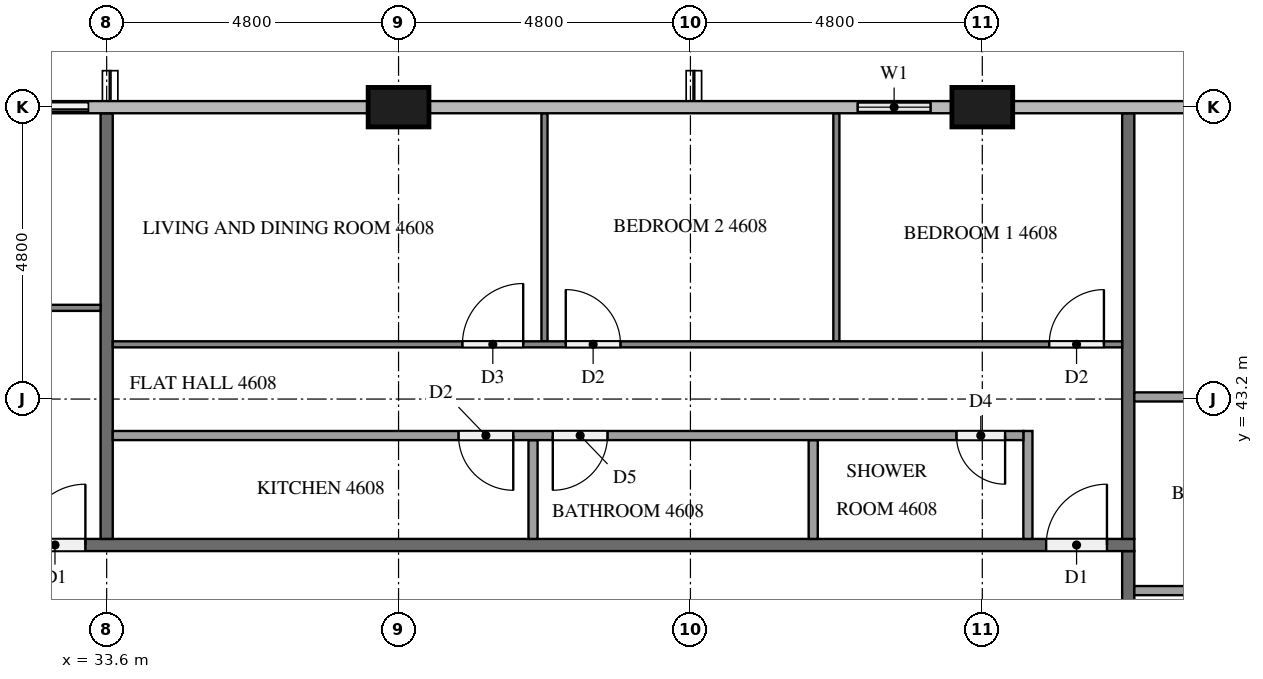
"""IFC4 building model, lengths in metres.
Left out: names, types, materials, properties, quantities, classifications, styles, units other than length and angle.
Written with IfcOpenShell. Run it as: python <this file> out.ifc"""

import sys

from ifc_helpers import new_model, si_unit, direction, frame, frame_2d, origin, origin_2d, place, context, subcontext, project, spatial, rectangle, extrude, element, fill, save


model = new_model("IFC4")
c1 = context("Model", 3, precision=1e-05, world=origin(), true_north=direction((0.0, 1.0)))
c2 = subcontext(c1, "Body", "Model", "MODEL_VIEW")
j1 = project(units=[si_unit("LENGTHUNIT", "METRE"), si_unit("PLANEANGLEUNIT", "RADIAN")], contexts=[c1])
p1 = place(None, origin())
s1 = spatial("IfcSite", under=j1, at=p1, CompositionType="ELEMENT")
p2 = place(p1, origin())
s2 = spatial("IfcBuilding", under=s1, at=p2, CompositionType="ELEMENT")
p3 = place(p2, frame((0.0, 0.0, 178.9)))
s3 = spatial("IfcBuildingStorey", under=s2, at=p3, CompositionType="ELEMENT", Elevation=178.9)
for number, where, z_axis, x_axis in (
    (1, (48.0, 48.0, 0.0), (0.0, 0.0, 1.0), (1.0, 0.0, 0.0)),
    (2, (38.4, 48.0, 0.0), (0.0, 0.0, 1.0), (1.0, 0.0, 0.0)),
):
    element("IfcColumn", number, at=place(p3, frame(where, z_axis=z_axis, x_axis=x_axis)), inside=s3, PredefinedType="COLUMN", context=c2, shape_type="SweptSolid", body=[
        extrude(rectangle(XDim=1.0, YDim=0.65, at=origin_2d()), origin(), (0.0, 0.0, 1.0), 3.2),
    ])
p4 = place(p3, frame((47.5, 48.0, 0.0), z_axis=(0.0, 0.0, 1.0), x_axis=(-1.0, 0.0, 0.0)))
e3 = element("IfcWall", 3, at=p4, inside=s3, PredefinedType="SOLIDWALL", context=c2, shape_type="SweptSolid", body=[
    extrude(rectangle(XDim=1.9, YDim=0.15, at=frame_2d((0.95, 0.0))), origin(), (0.0, 0.0, 1.0), 3.2),
])
p5 = place(p4, frame((0.35, 0.0, 0.9)))
e4 = element("IfcOpeningElement", 4, at=p5, cuts=e3, PredefinedType="OPENING", context=c2, shape_type="SweptSolid", body=[
    extrude(rectangle(XDim=1.2, YDim=1.4, at=frame_2d((0.6, 0.7))), frame((0.0, 0.085, 0.0), z_axis=(0.0, -1.0, 0.0), x_axis=(1.0, 0.0, 0.0)), (0.0, 0.0, 1.0), 0.17),
])
p6 = place(p3, frame((33.6, 48.0, 0.0), z_axis=(0.0, 0.0, 1.0), x_axis=(-1.0, 0.0, 0.0)))
e5 = element("IfcWall", 5, at=p6, inside=s3, PredefinedType="SOLIDWALL", context=c2, shape_type="SweptSolid", body=[
    extrude(rectangle(XDim=2.4, YDim=0.15, at=frame_2d((1.2, 0.0))), origin(), (0.0, 0.0, 1.0), 3.2),
])
p7 = place(p6, frame((0.3, 0.0, 0.0)))
e6 = element("IfcOpeningElement", 6, at=p7, cuts=e5, PredefinedType="OPENING", context=c2, shape_type="SweptSolid", body=[
    extrude(rectangle(XDim=1.8, YDim=2.4, at=frame_2d((0.9, 1.2))), frame((0.0, 0.085, 0.0), z_axis=(0.0, -1.0, 0.0), x_axis=(1.0, 0.0, 0.0)), (0.0, 0.0, 1.0), 0.17),
])
p8 = place(p3, frame((50.4, 40.7, 0.0), z_axis=(0.0, 0.0, 1.0), x_axis=(0.0, -1.0, 0.0)))
e7 = element("IfcWall", 7, at=p8, inside=s3, PredefinedType="PARTITIONING", context=c2, shape_type="SweptSolid", body=[
    extrude(rectangle(XDim=28.6, YDim=0.2, at=frame_2d((14.3, 0.0))), origin(), (0.0, 0.0, 1.0), 3.2),
])
p9 = place(p8, frame((27.3, 0.0, 0.0)))
e8 = element("IfcOpeningElement", 8, at=p9, cuts=e7, PredefinedType="OPENING", context=c2, shape_type="SweptSolid", body=[
    extrude(rectangle(XDim=1.1, YDim=2.1, at=frame_2d((0.55, 1.05))), frame((0.0, 0.11, 0.0), z_axis=(0.0, -1.0, 0.0), x_axis=(1.0, 0.0, 0.0)), (0.0, 0.0, 1.0), 0.22),
])
p10 = place(p8, frame((8.15, 0.0, 0.0)))
e9 = element("IfcOpeningElement", 9, at=p10, cuts=e7, PredefinedType="OPENING", context=c2, shape_type="SweptSolid", body=[
    extrude(rectangle(XDim=1.0, YDim=2.1, at=frame_2d((0.5, 1.05))), frame((0.0, 0.11, 0.0), z_axis=(0.0, -1.0, 0.0), x_axis=(1.0, 0.0, 0.0)), (0.0, 0.0, 1.0), 0.22),
])
p11 = place(p8, frame((0.95, 0.0, 0.0)))
e10 = element("IfcOpeningElement", 10, at=p11, cuts=e7, PredefinedType="OPENING", context=c2, shape_type="SweptSolid", body=[
    extrude(rectangle(XDim=1.0, YDim=2.1, at=frame_2d((0.5, 1.05))), frame((0.0, 0.11, 0.0), z_axis=(0.0, -1.0, 0.0), x_axis=(1.0, 0.0, 0.0)), (0.0, 0.0, 1.0), 0.22),
])
p12 = place(p3, frame((11.9, 40.8, 0.0), z_axis=(0.0, 0.0, 1.0), x_axis=(1.0, 0.0, 0.0)))
e11 = element("IfcWall", 11, at=p12, inside=s3, PredefinedType="PARTITIONING", context=c2, shape_type="SweptSolid", body=[
    extrude(rectangle(XDim=38.6, YDim=0.2, at=frame_2d((19.3, 0.0))), origin(), (0.0, 0.0, 1.0), 3.2),
])
p13 = place(p12, frame((37.15, 0.0, 0.0)))
e12 = element("IfcOpeningElement", 12, at=p13, cuts=e11, PredefinedType="OPENING", context=c2, shape_type="SweptSolid", body=[
    extrude(rectangle(XDim=1.0, YDim=2.1, at=frame_2d((0.5, 1.05))), frame((0.0, 0.11, 0.0), z_axis=(0.0, -1.0, 0.0), x_axis=(1.0, 0.0, 0.0)), (0.0, 0.0, 1.0), 0.22),
])
p14 = place(p12, frame((20.35, 0.0, 0.0)))
e13 = element("IfcOpeningElement", 13, at=p14, cuts=e11, PredefinedType="OPENING", context=c2, shape_type="SweptSolid", body=[
    extrude(rectangle(XDim=1.0, YDim=2.1, at=frame_2d((0.5, 1.05))), frame((0.0, 0.11, 0.0), z_axis=(0.0, -1.0, 0.0), x_axis=(1.0, 0.0, 0.0)), (0.0, 0.0, 1.0), 0.22),
])
p15 = place(p12, frame((13.15, 0.0, 0.0)))
e14 = element("IfcOpeningElement", 14, at=p15, cuts=e11, PredefinedType="OPENING", context=c2, shape_type="SweptSolid", body=[
    extrude(rectangle(XDim=1.0, YDim=2.1, at=frame_2d((0.5, 1.05))), frame((0.0, 0.11, 0.0), z_axis=(0.0, -1.0, 0.0), x_axis=(1.0, 0.0, 0.0)), (0.0, 0.0, 1.0), 0.22),
])
for number, where, z_axis, x_axis in (
    (15, (50.4, 40.9, 0.0), (0.0, 0.0, 1.0), (0.0, 1.0, 0.0)),
    (16, (33.6, 47.9, 0.0), (0.0, 0.0, 1.0), (0.0, -1.0, 0.0)),
):
    element("IfcWall", number, at=place(p3, frame(where, z_axis=z_axis, x_axis=x_axis)), inside=s3, PredefinedType="PARTITIONING", context=c2, shape_type="SweptSolid", body=[
        extrude(rectangle(XDim=7.0, YDim=0.2, at=frame_2d((3.5, 0.0))), origin(), (0.0, 0.0, 1.0), 3.2),
    ])
p16 = place(p3, frame((50.5, 43.235, 0.0), z_axis=(0.0, 0.0, 1.0), x_axis=(1.0, 0.0, 0.0)))
e17 = element("IfcWall", 17, at=p16, inside=s3, PredefinedType="PARTITIONING", context=c2, shape_type="SweptSolid", body=[
    extrude(rectangle(XDim=3.725, YDim=0.15, at=frame_2d((1.863, 0.0))), origin(), (0.0, 0.0, 1.0), 3.2),
])
p17 = place(p3, frame((50.5, 40.05, 0.0), z_axis=(0.0, 0.0, 1.0), x_axis=(1.0, 0.0, 0.0)))
e18 = element("IfcWall", 18, at=p17, inside=s3, PredefinedType="PARTITIONING", context=c2, shape_type="SweptSolid", body=[
    extrude(rectangle(XDim=3.875, YDim=0.15, at=frame_2d((1.938, 0.0))), origin(), (0.0, 0.0, 1.0), 3.2),
])
for number, where, z_axis, x_axis in (
    (19, (45.6, 44.15, 0.0), (0.0, 0.0, 1.0), (0.0, 1.0, 0.0)),
    (20, (40.8, 44.15, 0.0), (0.0, 0.0, 1.0), (0.0, 1.0, 0.0)),
):
    element("IfcWall", number, at=place(p3, frame(where, z_axis=z_axis, x_axis=x_axis)), inside=s3, PredefinedType="PARTITIONING", context=c2, shape_type="SweptSolid", body=[
        extrude(rectangle(XDim=3.75, YDim=0.1, at=frame_2d((1.875, 0.0))), origin(), (0.0, 0.0, 1.0), 3.2),
    ])
p18 = place(p3, frame((33.7, 44.1, 0.0), z_axis=(0.0, 0.0, 1.0), x_axis=(1.0, 0.0, 0.0)))
e21 = element("IfcWall", 21, at=p18, inside=s3, PredefinedType="PARTITIONING", context=c2, shape_type="SweptSolid", body=[
    extrude(rectangle(XDim=16.6, YDim=0.1, at=frame_2d((8.3, 0.0))), origin(), (0.0, 0.0, 1.0), 3.2),
])
p19 = place(p18, frame((15.4, 0.0, 0.0)))
e22 = element("IfcOpeningElement", 22, at=p19, cuts=e21, PredefinedType="OPENING", context=c2, shape_type="SweptSolid", body=[
    extrude(rectangle(XDim=0.9, YDim=2.1, at=frame_2d((0.45, 1.05))), frame((0.0, 0.06, 0.0), z_axis=(0.0, -1.0, 0.0), x_axis=(1.0, 0.0, 0.0)), (0.0, 0.0, 1.0), 0.12),
])
p20 = place(p18, frame((7.45, 0.0, 0.0)))
e23 = element("IfcOpeningElement", 23, at=p20, cuts=e21, PredefinedType="OPENING", context=c2, shape_type="SweptSolid", body=[
    extrude(rectangle(XDim=0.9, YDim=2.1, at=frame_2d((0.45, 1.05))), frame((0.0, 0.06, 0.0), z_axis=(0.0, -1.0, 0.0), x_axis=(1.0, 0.0, 0.0)), (0.0, 0.0, 1.0), 0.12),
])
p21 = place(p18, frame((5.75, 0.0, 0.0)))
e24 = element("IfcOpeningElement", 24, at=p21, cuts=e21, PredefinedType="OPENING", context=c2, shape_type="SweptSolid", body=[
    extrude(rectangle(XDim=1.0, YDim=2.1, at=frame_2d((0.5, 1.05))), frame((0.0, 0.06, 0.0), z_axis=(0.0, -1.0, 0.0), x_axis=(1.0, 0.0, 0.0)), (0.0, 0.0, 1.0), 0.12),
])
for number, where, z_axis, x_axis in (
    (25, (45.219, 40.9, 0.0), (0.0, 0.0, 1.0), (0.0, 1.0, 0.0)),
    (26, (40.612, 40.9, 0.0), (0.0, 0.0, 1.0), (0.0, 1.0, 0.0)),
):
    element("IfcWall", number, at=place(p3, frame(where, z_axis=z_axis, x_axis=x_axis)), inside=s3, PredefinedType="PARTITIONING", context=c2, shape_type="SweptSolid", body=[
        extrude(rectangle(XDim=1.625, YDim=0.15, at=frame_2d((0.812, 0.0))), origin(), (0.0, 0.0, 1.0), 3.2),
    ])
p22 = place(p3, frame((48.75, 40.9, 0.0), z_axis=(0.0, 0.0, 1.0), x_axis=(0.0, 1.0, 0.0)))
e27 = element("IfcWall", 27, at=p22, inside=s3, PredefinedType="PARTITIONING", context=c2, shape_type="SweptSolid", body=[
    extrude(rectangle(XDim=1.775, YDim=0.15, at=frame_2d((0.888, 0.0))), origin(), (0.0, 0.0, 1.0), 3.2),
])
p23 = place(p3, frame((48.675, 42.6, 0.0), z_axis=(0.0, 0.0, 1.0), x_axis=(-1.0, 0.0, 0.0)))
e28 = element("IfcWall", 28, at=p23, inside=s3, PredefinedType="PARTITIONING", context=c2, shape_type="SweptSolid", body=[
    extrude(rectangle(XDim=14.975, YDim=0.15, at=frame_2d((7.488, 0.0))), origin(), (0.0, 0.0, 1.0), 3.2),
])
p24 = place(p23, frame((0.3, 0.0, 0.0)))
e29 = element("IfcOpeningElement", 29, at=p24, cuts=e28, PredefinedType="OPENING", context=c2, shape_type="SweptSolid", body=[
    extrude(rectangle(XDim=0.8, YDim=2.1, at=frame_2d((0.4, 1.05))), frame((0.0, 0.085, 0.0), z_axis=(0.0, -1.0, 0.0), x_axis=(1.0, 0.0, 0.0)), (0.0, 0.0, 1.0), 0.17),
])
p25 = place(p23, frame((6.838, 0.0, 0.0)))
e30 = element("IfcOpeningElement", 30, at=p25, cuts=e28, PredefinedType="OPENING", context=c2, shape_type="SweptSolid", body=[
    extrude(rectangle(XDim=0.9, YDim=2.1, at=frame_2d((0.45, 1.05))), frame((0.0, 0.085, 0.0), z_axis=(0.0, -1.0, 0.0), x_axis=(1.0, 0.0, 0.0)), (0.0, 0.0, 1.0), 0.17),
])
p26 = place(p23, frame((8.388, 0.0, 0.0)))
e31 = element("IfcOpeningElement", 31, at=p26, cuts=e28, PredefinedType="OPENING", context=c2, shape_type="SweptSolid", body=[
    extrude(rectangle(XDim=0.9, YDim=2.1, at=frame_2d((0.45, 1.05))), frame((0.0, 0.085, 0.0), z_axis=(0.0, -1.0, 0.0), x_axis=(1.0, 0.0, 0.0)), (0.0, 0.0, 1.0), 0.17),
])
p27 = place(p3, frame((26.5, 44.7, 0.0), z_axis=(0.0, 0.0, 1.0), x_axis=(1.0, 0.0, 0.0)))
e32 = element("IfcWall", 32, at=p27, inside=s3, PredefinedType="PARTITIONING", context=c2, shape_type="SweptSolid", body=[
    extrude(rectangle(XDim=7.0, YDim=0.1, at=frame_2d((3.5, 0.0))), origin(), (0.0, 0.0, 1.0), 3.2),
])
p28 = place(p27, frame((0.3, 0.0, 0.0)))
e33 = element("IfcOpeningElement", 33, at=p28, cuts=e32, PredefinedType="OPENING", context=c2, shape_type="SweptSolid", body=[
    extrude(rectangle(XDim=1.0, YDim=2.1, at=frame_2d((0.5, 1.05))), frame((0.0, 0.06, 0.0), z_axis=(0.0, -1.0, 0.0), x_axis=(1.0, 0.0, 0.0)), (0.0, 0.0, 1.0), 0.12),
])
p29 = place(p5, origin())
e34 = element("IfcWindow", 34, at=p29, inside=s3, PartitioningType="SINGLE_PANEL", PredefinedType="WINDOW", context=c2, shape_type="SweptSolid", body=[
    extrude(rectangle(XDim=1.2, YDim=1.4, at=frame_2d((0.6, 0.7))), frame((0.0, 0.03, 0.0), z_axis=(0.0, -1.0, 0.0), x_axis=(1.0, 0.0, 0.0)), (0.0, 0.0, 1.0), 0.06),
])
fill(e4, e34)
p30 = place(p7, origin())
e35 = element("IfcDoor", 35, at=p30, inside=s3, OperationType="SLIDING_TO_LEFT", PredefinedType="DOOR", context=c2, shape_type="SweptSolid", body=[
    extrude(rectangle(XDim=1.8, YDim=2.4, at=frame_2d((0.9, 1.2))), frame((0.0, 0.025, 0.0), z_axis=(0.0, -1.0, 0.0), x_axis=(1.0, 0.0, 0.0)), (0.0, 0.0, 1.0), 0.05),
])
fill(e6, e35)
p31 = place(p13, origin())
e36 = element("IfcDoor", 36, at=p31, inside=s3, OperationType="SINGLE_SWING_RIGHT", PredefinedType="DOOR", context=c2, shape_type="SweptSolid", body=[
    extrude(rectangle(XDim=1.0, YDim=2.1, at=frame_2d((0.5, 1.05))), frame((0.0, 0.025, 0.0), z_axis=(0.0, -1.0, 0.0), x_axis=(1.0, 0.0, 0.0)), (0.0, 0.0, 1.0), 0.05),
])
fill(e12, e36)
p32 = place(p14, origin())
e37 = element("IfcDoor", 37, at=p32, inside=s3, OperationType="SINGLE_SWING_RIGHT", PredefinedType="DOOR", context=c2, shape_type="SweptSolid", body=[
    extrude(rectangle(XDim=1.0, YDim=2.1, at=frame_2d((0.5, 1.05))), frame((0.0, 0.025, 0.0), z_axis=(0.0, -1.0, 0.0), x_axis=(1.0, 0.0, 0.0)), (0.0, 0.0, 1.0), 0.05),
])
fill(e13, e37)
p33 = place(p19, origin())
e38 = element("IfcDoor", 38, at=p33, inside=s3, OperationType="SINGLE_SWING_RIGHT", PredefinedType="DOOR", context=c2, shape_type="SweptSolid", body=[
    extrude(rectangle(XDim=0.9, YDim=2.1, at=frame_2d((0.45, 1.05))), frame((0.0, 0.025, 0.0), z_axis=(0.0, -1.0, 0.0), x_axis=(1.0, 0.0, 0.0)), (0.0, 0.0, 1.0), 0.05),
])
fill(e22, e38)
p34 = place(p20, origin())
e39 = element("IfcDoor", 39, at=p34, inside=s3, OperationType="SINGLE_SWING_LEFT", PredefinedType="DOOR", context=c2, shape_type="SweptSolid", body=[
    extrude(rectangle(XDim=0.9, YDim=2.1, at=frame_2d((0.45, 1.05))), frame((0.0, 0.025, 0.0), z_axis=(0.0, -1.0, 0.0), x_axis=(1.0, 0.0, 0.0)), (0.0, 0.0, 1.0), 0.05),
])
fill(e23, e39)
p35 = place(p21, origin())
e40 = element("IfcDoor", 40, at=p35, inside=s3, OperationType="SINGLE_SWING_RIGHT", PredefinedType="DOOR", context=c2, shape_type="SweptSolid", body=[
    extrude(rectangle(XDim=1.0, YDim=2.1, at=frame_2d((0.5, 1.05))), frame((0.0, 0.025, 0.0), z_axis=(0.0, -1.0, 0.0), x_axis=(1.0, 0.0, 0.0)), (0.0, 0.0, 1.0), 0.05),
])
fill(e24, e40)
p36 = place(p24, origin())
e41 = element("IfcDoor", 41, at=p36, inside=s3, OperationType="SINGLE_SWING_LEFT", PredefinedType="DOOR", context=c2, shape_type="SweptSolid", body=[
    extrude(rectangle(XDim=0.8, YDim=2.1, at=frame_2d((0.4, 1.05))), frame((0.0, 0.025, 0.0), z_axis=(0.0, -1.0, 0.0), x_axis=(1.0, 0.0, 0.0)), (0.0, 0.0, 1.0), 0.05),
])
fill(e29, e41)
p37 = place(p25, origin())
e42 = element("IfcDoor", 42, at=p37, inside=s3, OperationType="SINGLE_SWING_RIGHT", PredefinedType="DOOR", context=c2, shape_type="SweptSolid", body=[
    extrude(rectangle(XDim=0.9, YDim=2.1, at=frame_2d((0.45, 1.05))), frame((0.0, 0.025, 0.0), z_axis=(0.0, -1.0, 0.0), x_axis=(1.0, 0.0, 0.0)), (0.0, 0.0, 1.0), 0.05),
])
fill(e30, e42)
p38 = place(p26, origin())
e43 = element("IfcDoor", 43, at=p38, inside=s3, OperationType="SINGLE_SWING_LEFT", PredefinedType="DOOR", context=c2, shape_type="SweptSolid", body=[
    extrude(rectangle(XDim=0.9, YDim=2.1, at=frame_2d((0.45, 1.05))), frame((0.0, 0.025, 0.0), z_axis=(0.0, -1.0, 0.0), x_axis=(1.0, 0.0, 0.0)), (0.0, 0.0, 1.0), 0.05),
])
fill(e31, e43)
save(model, sys.argv[1])
